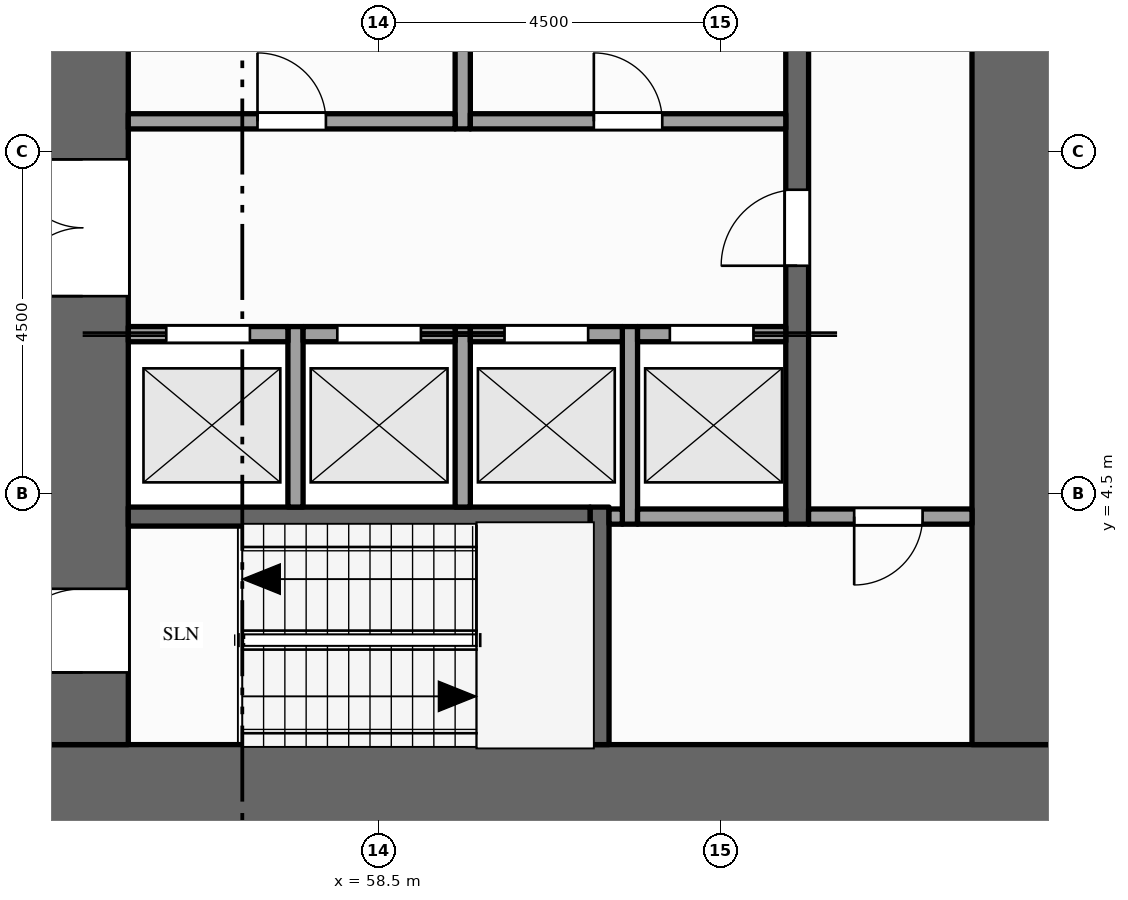
"""IFC4 building model, lengths in metres.
Left out: names, types, materials, properties, quantities, classifications, styles, units other than length and angle.
Written with IfcOpenShell. Run it as: python <this file> out.ifc"""

import sys

from ifc_helpers import new_model, si_unit, direction, frame, frame_2d, origin, place, context, subcontext, project, spatial, rectangle, extrude, element, fill, save


model = new_model("IFC4")
c1 = context("Model", 3, precision=1e-05, world=origin(), true_north=direction((0.0, 1.0)))
c2 = subcontext(c1, "Body", "Model", "MODEL_VIEW")
j1 = project(units=[si_unit("LENGTHUNIT", "METRE"), si_unit("PLANEANGLEUNIT", "RADIAN")], contexts=[c1])
p1 = place(None, origin())
s1 = spatial("IfcSite", under=j1, at=p1, CompositionType="ELEMENT")
p2 = place(p1, origin())
s2 = spatial("IfcBuilding", under=s1, at=p2, CompositionType="ELEMENT")
p3 = place(p2, frame((0.0, 0.0, 83.0)))
s3 = spatial("IfcBuildingStorey", under=s2, at=p3, CompositionType="ELEMENT", Elevation=83.0)
p4 = place(p3, frame((67.5, 0.6, -0.15), z_axis=(0.0, 0.0, 1.0), x_axis=(-1.0, 0.0, 0.0)))
e1 = element("IfcWall", 1, at=p4, inside=s3, PredefinedType="SHEAR", context=c2, shape_type="SweptSolid", body=[
    extrude(rectangle(XDim=13.5, YDim=1.2, at=frame_2d((6.75, 0.0))), origin(), (0.0, 0.0, 1.0), 4.0),
])
p5 = place(p3, frame((54.6, 1.2, -0.15), z_axis=(0.0, 0.0, 1.0), x_axis=(0.0, 1.0, 0.0)))
e2 = element("IfcWall", 2, at=p5, inside=s3, PredefinedType="SHEAR", context=c2, shape_type="SweptSolid", body=[
    extrude(rectangle(XDim=20.1, YDim=1.2, at=frame_2d((10.05, 0.0))), origin(), (0.0, 0.0, 1.0), 4.0),
])
p6 = place(p5, frame((5.9, 0.0, 0.15)))
e3 = element("IfcOpeningElement", 3, at=p6, cuts=e2, PredefinedType="OPENING", context=c2, shape_type="SweptSolid", body=[
    extrude(rectangle(XDim=1.8, YDim=2.1, at=frame_2d((0.9, 1.05))), frame((0.0, 0.61, 0.0), z_axis=(0.0, -1.0, 0.0), x_axis=(1.0, 0.0, 0.0)), (0.0, 0.0, 1.0), 1.22),
])
p7 = place(p5, frame((11.95, 0.0, 0.15)))
e4 = element("IfcOpeningElement", 4, at=p7, cuts=e2, PredefinedType="OPENING", context=c2, shape_type="SweptSolid", body=[
    extrude(rectangle(XDim=1.1, YDim=2.1, at=frame_2d((0.55, 1.05))), frame((0.0, 0.61, 0.0), z_axis=(0.0, -1.0, 0.0), x_axis=(1.0, 0.0, 0.0)), (0.0, 0.0, 1.0), 1.22),
])
p8 = place(p5, frame((0.95, 0.0, 0.15)))
e5 = element("IfcOpeningElement", 5, at=p8, cuts=e2, PredefinedType="OPENING", context=c2, shape_type="SweptSolid", body=[
    extrude(rectangle(XDim=1.1, YDim=2.1, at=frame_2d((0.55, 1.05))), frame((0.0, 0.61, 0.0), z_axis=(0.0, -1.0, 0.0), x_axis=(1.0, 0.0, 0.0)), (0.0, 0.0, 1.0), 1.22),
])
p9 = place(p5, frame((18.15, 0.0, 0.15)))
e6 = element("IfcOpeningElement", 6, at=p9, cuts=e2, PredefinedType="OPENING", context=c2, shape_type="SweptSolid", body=[
    extrude(rectangle(XDim=1.1, YDim=2.1, at=frame_2d((0.55, 1.05))), frame((0.0, 0.61, 0.0), z_axis=(0.0, -1.0, 0.0), x_axis=(1.0, 0.0, 0.0)), (0.0, 0.0, 1.0), 1.22),
])
p10 = place(p3, frame((66.9, 1.2, -0.15), z_axis=(0.0, 0.0, 1.0), x_axis=(0.0, 1.0, 0.0)))
e7 = element("IfcWall", 7, at=p10, inside=s3, PredefinedType="SHEAR", context=c2, shape_type="SweptSolid", body=[
    extrude(rectangle(XDim=20.1, YDim=1.2, at=frame_2d((10.05, 0.0))), origin(), (0.0, 0.0, 1.0), 4.0),
])
for number, where, z_axis, x_axis in (
    (8, (57.4, 4.325, 0.0), (0.0, 0.0, 1.0), (0.0, 1.0, 0.0)),
    (9, (59.6, 4.325, 0.0), (0.0, 0.0, 1.0), (0.0, 1.0, 0.0)),
):
    element("IfcWall", number, at=place(p3, frame(where, z_axis=z_axis, x_axis=x_axis)), inside=s3, PredefinedType="SOLIDWALL", context=c2, shape_type="SweptSolid", body=[
        extrude(rectangle(XDim=2.375, YDim=0.2, at=frame_2d((1.188, 0.0))), origin(), (0.0, 0.0, 1.0), 3.85),
    ])
p11 = place(p3, frame((59.6, 9.3, 0.0), z_axis=(0.0, 0.0, 1.0), x_axis=(0.0, 1.0, 0.0)))
e10 = element("IfcWall", 10, at=p11, inside=s3, PredefinedType="PARTITIONING", context=c2, shape_type="SweptSolid", body=[
    extrude(rectangle(XDim=6.2, YDim=0.2, at=frame_2d((3.1, 0.0))), origin(), (0.0, 0.0, 1.0), 3.85),
])
p12 = place(p11, frame((3.9, 0.0, 0.0)))
e11 = element("IfcOpeningElement", 11, at=p12, cuts=e10, PredefinedType="OPENING", context=c2, shape_type="SweptSolid", body=[
    extrude(rectangle(XDim=1.0, YDim=2.1, at=frame_2d((0.5, 1.05))), frame((0.0, 0.11, 0.0), z_axis=(0.0, -1.0, 0.0), x_axis=(1.0, 0.0, 0.0)), (0.0, 0.0, 1.0), 0.22),
])
p13 = place(p3, frame((61.4, 1.2, 0.0), z_axis=(0.0, 0.0, 1.0), x_axis=(0.0, 1.0, 0.0)))
e12 = element("IfcWall", 12, at=p13, inside=s3, PredefinedType="SHEAR", context=c2, shape_type="SweptSolid", body=[
    extrude(rectangle(XDim=3.125, YDim=0.25, at=frame_2d((1.562, 0.0))), origin(), (0.0, 0.0, 1.0), 3.85),
])
p14 = place(p3, frame((61.8, 4.1, 0.0), z_axis=(0.0, 0.0, 1.0), x_axis=(0.0, 1.0, 0.0)))
e13 = element("IfcWall", 13, at=p14, inside=s3, PredefinedType="SOLIDWALL", context=c2, shape_type="SweptSolid", body=[
    extrude(rectangle(XDim=2.6, YDim=0.2, at=frame_2d((1.3, 0.0))), origin(), (0.0, 0.0, 1.0), 3.85),
])
p15 = place(p3, frame((64.0, 4.1, 0.0), z_axis=(0.0, 0.0, 1.0), x_axis=(0.0, 1.0, 0.0)))
e14 = element("IfcWall", 14, at=p15, inside=s3, PredefinedType="SHEAR", context=c2, shape_type="SweptSolid", body=[
    extrude(rectangle(XDim=14.5, YDim=0.3, at=frame_2d((7.25, 0.0))), origin(), (0.0, 0.0, 1.0), 3.85),
])
p16 = place(p15, frame((3.4, 0.0, 0.0)))
e15 = element("IfcOpeningElement", 15, at=p16, cuts=e14, PredefinedType="OPENING", context=c2, shape_type="SweptSolid", body=[
    extrude(rectangle(XDim=1.0, YDim=2.1, at=frame_2d((0.5, 1.05))), frame((0.0, 0.16, 0.0), z_axis=(0.0, -1.0, 0.0), x_axis=(1.0, 0.0, 0.0)), (0.0, 0.0, 1.0), 0.32),
])
p17 = place(p15, frame((9.1, 0.0, 0.0)))
e16 = element("IfcOpeningElement", 16, at=p17, cuts=e14, PredefinedType="OPENING", context=c2, shape_type="SweptSolid", body=[
    extrude(rectangle(XDim=1.0, YDim=2.1, at=frame_2d((0.5, 1.05))), frame((0.0, 0.16, 0.0), z_axis=(0.0, -1.0, 0.0), x_axis=(1.0, 0.0, 0.0)), (0.0, 0.0, 1.0), 0.32),
])
p18 = place(p3, frame((55.2, 4.2, 0.0), z_axis=(0.0, 0.0, 1.0), x_axis=(1.0, 0.0, 0.0)))
e17 = element("IfcWall", 17, at=p18, inside=s3, PredefinedType="SHEAR", context=c2, shape_type="SweptSolid", body=[
    extrude(rectangle(XDim=6.075, YDim=0.25, at=frame_2d((3.038, 0.0))), origin(), (0.0, 0.0, 1.0), 3.85),
])
p19 = place(p3, frame((61.525, 4.2, 0.0), z_axis=(0.0, 0.0, 1.0), x_axis=(1.0, 0.0, 0.0)))
e18 = element("IfcWall", 18, at=p19, inside=s3, PredefinedType="SOLIDWALL", context=c2, shape_type="SweptSolid", body=[
    extrude(rectangle(XDim=0.175, YDim=0.2, at=frame_2d((0.087, 0.0))), origin(), (0.0, 0.0, 1.0), 3.85),
])
p20 = place(p3, frame((61.9, 4.2, 0.0), z_axis=(0.0, 0.0, 1.0), x_axis=(1.0, 0.0, 0.0)))
e19 = element("IfcWall", 19, at=p20, inside=s3, PredefinedType="SOLIDWALL", context=c2, shape_type="SweptSolid", body=[
    extrude(rectangle(XDim=1.95, YDim=0.2, at=frame_2d((0.975, 0.0))), origin(), (0.0, 0.0, 1.0), 3.85),
])
p21 = place(p3, frame((64.15, 4.2, 0.0), z_axis=(0.0, 0.0, 1.0), x_axis=(1.0, 0.0, 0.0)))
e20 = element("IfcWall", 20, at=p21, inside=s3, PredefinedType="PARTITIONING", context=c2, shape_type="SweptSolid", body=[
    extrude(rectangle(XDim=2.15, YDim=0.2, at=frame_2d((1.075, 0.0))), origin(), (0.0, 0.0, 1.0), 3.85),
])
p22 = place(p21, frame((0.6, 0.0, 0.0)))
e21 = element("IfcOpeningElement", 21, at=p22, cuts=e20, PredefinedType="OPENING", context=c2, shape_type="SweptSolid", body=[
    extrude(rectangle(XDim=0.9, YDim=2.1, at=frame_2d((0.45, 1.05))), frame((0.0, 0.11, 0.0), z_axis=(0.0, -1.0, 0.0), x_axis=(1.0, 0.0, 0.0)), (0.0, 0.0, 1.0), 0.22),
])
p23 = place(p3, frame((55.2, 6.6, 0.0), z_axis=(0.0, 0.0, 1.0), x_axis=(1.0, 0.0, 0.0)))
e22 = element("IfcWall", 22, at=p23, inside=s3, PredefinedType="SOLIDWALL", context=c2, shape_type="SweptSolid", body=[
    extrude(rectangle(XDim=2.1, YDim=0.2, at=frame_2d((1.05, 0.0))), origin(), (0.0, 0.0, 1.0), 3.85),
])
p24 = place(p23, frame((0.5, 0.0, 0.012)))
e23 = element("IfcOpeningElement", 23, at=p24, cuts=e22, PredefinedType="OPENING", context=c2, shape_type="SweptSolid", body=[
    extrude(rectangle(XDim=1.1, YDim=2.1, at=frame_2d((0.55, 1.05))), frame((0.0, 0.11, 0.0), z_axis=(0.0, -1.0, 0.0), x_axis=(1.0, 0.0, 0.0)), (0.0, 0.0, 1.0), 0.22),
])
p25 = place(p3, frame((57.5, 6.6, 0.0), z_axis=(0.0, 0.0, 1.0), x_axis=(1.0, 0.0, 0.0)))
e24 = element("IfcWall", 24, at=p25, inside=s3, PredefinedType="SOLIDWALL", context=c2, shape_type="SweptSolid", body=[
    extrude(rectangle(XDim=2.0, YDim=0.2, at=frame_2d((1.0, 0.0))), origin(), (0.0, 0.0, 1.0), 3.85),
])
p26 = place(p25, frame((0.45, 0.0, 0.012)))
e25 = element("IfcOpeningElement", 25, at=p26, cuts=e24, PredefinedType="OPENING", context=c2, shape_type="SweptSolid", body=[
    extrude(rectangle(XDim=1.1, YDim=2.1, at=frame_2d((0.55, 1.05))), frame((0.0, 0.11, 0.0), z_axis=(0.0, -1.0, 0.0), x_axis=(1.0, 0.0, 0.0)), (0.0, 0.0, 1.0), 0.22),
])
p27 = place(p3, frame((59.7, 6.6, 0.0), z_axis=(0.0, 0.0, 1.0), x_axis=(1.0, 0.0, 0.0)))
e26 = element("IfcWall", 26, at=p27, inside=s3, PredefinedType="SOLIDWALL", context=c2, shape_type="SweptSolid", body=[
    extrude(rectangle(XDim=2.0, YDim=0.2, at=frame_2d((1.0, 0.0))), origin(), (0.0, 0.0, 1.0), 3.85),
])
p28 = place(p27, frame((0.45, 0.0, 0.012)))
e27 = element("IfcOpeningElement", 27, at=p28, cuts=e26, PredefinedType="OPENING", context=c2, shape_type="SweptSolid", body=[
    extrude(rectangle(XDim=1.1, YDim=2.1, at=frame_2d((0.55, 1.05))), frame((0.0, 0.11, 0.0), z_axis=(0.0, -1.0, 0.0), x_axis=(1.0, 0.0, 0.0)), (0.0, 0.0, 1.0), 0.22),
])
p29 = place(p3, frame((61.9, 6.6, 0.0), z_axis=(0.0, 0.0, 1.0), x_axis=(1.0, 0.0, 0.0)))
e28 = element("IfcWall", 28, at=p29, inside=s3, PredefinedType="SOLIDWALL", context=c2, shape_type="SweptSolid", body=[
    extrude(rectangle(XDim=1.95, YDim=0.2, at=frame_2d((0.975, 0.0))), origin(), (0.0, 0.0, 1.0), 3.85),
])
p30 = place(p29, frame((0.425, 0.0, 0.012)))
e29 = element("IfcOpeningElement", 29, at=p30, cuts=e28, PredefinedType="OPENING", context=c2, shape_type="SweptSolid", body=[
    extrude(rectangle(XDim=1.1, YDim=2.1, at=frame_2d((0.55, 1.05))), frame((0.0, 0.11, 0.0), z_axis=(0.0, -1.0, 0.0), x_axis=(1.0, 0.0, 0.0)), (0.0, 0.0, 1.0), 0.22),
])
p31 = place(p3, frame((55.2, 9.4, 0.0), z_axis=(0.0, 0.0, 1.0), x_axis=(1.0, 0.0, 0.0)))
e30 = element("IfcWall", 30, at=p31, inside=s3, PredefinedType="PARTITIONING", context=c2, shape_type="SweptSolid", body=[
    extrude(rectangle(XDim=4.3, YDim=0.2, at=frame_2d((2.15, 0.0))), origin(), (0.0, 0.0, 1.0), 3.85),
])
p32 = place(p31, frame((1.7, 0.0, 0.0)))
e31 = element("IfcOpeningElement", 31, at=p32, cuts=e30, PredefinedType="OPENING", context=c2, shape_type="SweptSolid", body=[
    extrude(rectangle(XDim=0.9, YDim=2.1, at=frame_2d((0.45, 1.05))), frame((0.0, 0.11, 0.0), z_axis=(0.0, -1.0, 0.0), x_axis=(1.0, 0.0, 0.0)), (0.0, 0.0, 1.0), 0.22),
])
p33 = place(p3, frame((59.7, 9.4, 0.0), z_axis=(0.0, 0.0, 1.0), x_axis=(1.0, 0.0, 0.0)))
e32 = element("IfcWall", 32, at=p33, inside=s3, PredefinedType="PARTITIONING", context=c2, shape_type="SweptSolid", body=[
    extrude(rectangle(XDim=4.15, YDim=0.2, at=frame_2d((2.075, 0.0))), origin(), (0.0, 0.0, 1.0), 3.85),
])
p34 = place(p33, frame((1.625, 0.0, 0.0)))
e33 = element("IfcOpeningElement", 33, at=p34, cuts=e32, PredefinedType="OPENING", context=c2, shape_type="SweptSolid", body=[
    extrude(rectangle(XDim=0.9, YDim=2.1, at=frame_2d((0.45, 1.05))), frame((0.0, 0.11, 0.0), z_axis=(0.0, -1.0, 0.0), x_axis=(1.0, 0.0, 0.0)), (0.0, 0.0, 1.0), 0.22),
])
p35 = place(p24, origin())
e34 = element("IfcDoor", 34, at=p35, inside=s3, OperationType="SLIDING_TO_LEFT", PredefinedType="DOOR", context=c2, shape_type="SweptSolid", body=[
    extrude(rectangle(XDim=1.1, YDim=2.1, at=frame_2d((0.55, 1.05))), frame((0.0, 0.025, 0.0), z_axis=(0.0, -1.0, 0.0), x_axis=(1.0, 0.0, 0.0)), (0.0, 0.0, 1.0), 0.05),
])
fill(e23, e34)
p36 = place(p26, origin())
e35 = element("IfcDoor", 35, at=p36, inside=s3, OperationType="SLIDING_TO_RIGHT", PredefinedType="DOOR", context=c2, shape_type="SweptSolid", body=[
    extrude(rectangle(XDim=1.1, YDim=2.1, at=frame_2d((0.55, 1.05))), frame((0.0, 0.025, 0.0), z_axis=(0.0, -1.0, 0.0), x_axis=(1.0, 0.0, 0.0)), (0.0, 0.0, 1.0), 0.05),
])
fill(e25, e35)
p37 = place(p28, origin())
e36 = element("IfcDoor", 36, at=p37, inside=s3, OperationType="SLIDING_TO_LEFT", PredefinedType="DOOR", context=c2, shape_type="SweptSolid", body=[
    extrude(rectangle(XDim=1.1, YDim=2.1, at=frame_2d((0.55, 1.05))), frame((0.0, 0.025, 0.0), z_axis=(0.0, -1.0, 0.0), x_axis=(1.0, 0.0, 0.0)), (0.0, 0.0, 1.0), 0.05),
])
fill(e27, e36)
p38 = place(p30, origin())
e37 = element("IfcDoor", 37, at=p38, inside=s3, OperationType="SLIDING_TO_RIGHT", PredefinedType="DOOR", context=c2, shape_type="SweptSolid", body=[
    extrude(rectangle(XDim=1.1, YDim=2.1, at=frame_2d((0.55, 1.05))), frame((0.0, 0.025, 0.0), z_axis=(0.0, -1.0, 0.0), x_axis=(1.0, 0.0, 0.0)), (0.0, 0.0, 1.0), 0.05),
])
fill(e29, e37)
p39 = place(p6, origin())
e38 = element("IfcDoor", 38, at=p39, inside=s3, OperationType="DOUBLE_DOOR_SINGLE_SWING", PredefinedType="DOOR", context=c2, shape_type="SweptSolid", body=[
    extrude(rectangle(XDim=1.8, YDim=2.1, at=frame_2d((0.9, 1.05))), frame((0.0, 0.025, 0.0), z_axis=(0.0, -1.0, 0.0), x_axis=(1.0, 0.0, 0.0)), (0.0, 0.0, 1.0), 0.05),
])
fill(e3, e38)
p40 = place(p16, origin())
e39 = element("IfcDoor", 39, at=p40, inside=s3, OperationType="SINGLE_SWING_LEFT", PredefinedType="DOOR", context=c2, shape_type="SweptSolid", body=[
    extrude(rectangle(XDim=1.0, YDim=2.1, at=frame_2d((0.5, 1.05))), frame((0.0, 0.025, 0.0), z_axis=(0.0, -1.0, 0.0), x_axis=(1.0, 0.0, 0.0)), (0.0, 0.0, 1.0), 0.05),
])
fill(e15, e39)
p41 = place(p8, origin())
e40 = element("IfcDoor", 40, at=p41, inside=s3, OperationType="SINGLE_SWING_LEFT", PredefinedType="DOOR", context=c2, shape_type="SweptSolid", body=[
    extrude(rectangle(XDim=1.1, YDim=2.1, at=frame_2d((0.55, 1.05))), frame((0.0, 0.025, 0.0), z_axis=(0.0, -1.0, 0.0), x_axis=(1.0, 0.0, 0.0)), (0.0, 0.0, 1.0), 0.05),
])
fill(e5, e40)
p42 = place(p22, origin())
e41 = element("IfcDoor", 41, at=p42, inside=s3, OperationType="SINGLE_SWING_LEFT", PredefinedType="DOOR", context=c2, shape_type="SweptSolid", body=[
    extrude(rectangle(XDim=0.9, YDim=2.1, at=frame_2d((0.45, 1.05))), frame((0.0, 0.025, 0.0), z_axis=(0.0, -1.0, 0.0), x_axis=(1.0, 0.0, 0.0)), (0.0, 0.0, 1.0), 0.05),
])
fill(e21, e41)
p43 = place(p32, origin())
e42 = element("IfcDoor", 42, at=p43, inside=s3, OperationType="SINGLE_SWING_LEFT", PredefinedType="DOOR", context=c2, shape_type="SweptSolid", body=[
    extrude(rectangle(XDim=0.9, YDim=2.1, at=frame_2d((0.45, 1.05))), frame((0.0, 0.025, 0.0), z_axis=(0.0, -1.0, 0.0), x_axis=(1.0, 0.0, 0.0)), (0.0, 0.0, 1.0), 0.05),
])
fill(e31, e42)
p44 = place(p34, origin())
e43 = element("IfcDoor", 43, at=p44, inside=s3, OperationType="SINGLE_SWING_LEFT", PredefinedType="DOOR", context=c2, shape_type="SweptSolid", body=[
    extrude(rectangle(XDim=0.9, YDim=2.1, at=frame_2d((0.45, 1.05))), frame((0.0, 0.025, 0.0), z_axis=(0.0, -1.0, 0.0), x_axis=(1.0, 0.0, 0.0)), (0.0, 0.0, 1.0), 0.05),
])
fill(e33, e43)
save(model, sys.argv[1])
